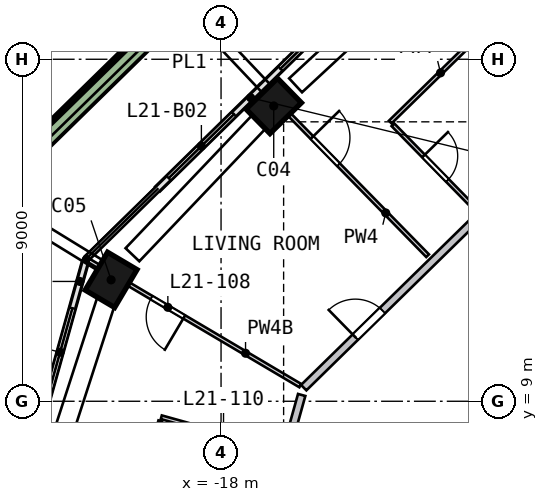
"""IFC4 building model, lengths in metres.
Left out: names, types, materials, properties, quantities, classifications, styles, units other than length and angle.
Written with IfcOpenShell. Run it as: python <this file> out.ifc"""

import sys

from ifc_helpers import new_model, si_unit, direction, frame, frame_2d, origin, origin_2d, place, context, subcontext, project, spatial, rectangle, extrude, element, fill, save


model = new_model("IFC4")
c1 = context("Model", 3, precision=1e-05, world=origin(), true_north=direction((0.0, 1.0)))
c2 = subcontext(c1, "Body", "Model", "MODEL_VIEW")
j1 = project(units=[si_unit("LENGTHUNIT", "METRE"), si_unit("PLANEANGLEUNIT", "RADIAN")], contexts=[c1])
p1 = place(None, origin())
s1 = spatial("IfcSite", under=j1, at=p1, CompositionType="ELEMENT")
p2 = place(p1, origin())
s2 = spatial("IfcBuilding", under=s1, at=p2, CompositionType="ELEMENT")
p3 = place(p2, frame((0.0, 0.0, 93.0)))
s3 = spatial("IfcBuildingStorey", under=s2, at=p3, CompositionType="ELEMENT", Elevation=93.0)
p4 = place(p3, frame((-16.518, 16.867, 0.0), z_axis=(-0.079548847, -0.079244645, 0.993676138), x_axis=(-0.709905463, -0.695289434, -0.11228017)))
e1 = element("IfcColumn", 1, at=p4, inside=s3, PredefinedType="COLUMN", context=c2, shape_type="SweptSolid", body=[
    extrude(rectangle(XDim=1.15, YDim=0.9, at=origin_2d()), origin(), (0.0, 0.0, 1.0), 3.21),
])
p5 = place(p3, frame((-20.824, 12.315, 0.0), z_axis=(-0.057704047, -0.099518574, 0.993361111), x_axis=(0.505557069, 0.855090222, 0.115033745)))
e2 = element("IfcColumn", 2, at=p5, inside=s3, PredefinedType="COLUMN", context=c2, shape_type="SweptSolid", body=[
    extrude(rectangle(XDim=1.15, YDim=0.9, at=origin_2d()), origin(), (0.0, 0.0, 1.0), 3.211),
])
p6 = place(p3, frame((-5.516, 13.717, 0.0), z_axis=(0.0, 0.0, 1.0), x_axis=(-0.707106781, -0.707106781, 0.0)))
e3 = element("IfcWall", 3, at=p6, inside=s3, PredefinedType="SHEAR", context=c2, shape_type="SweptSolid", body=[
    extrude(rectangle(XDim=11.598, YDim=0.8, at=frame_2d((5.799, 0.0))), origin(), (0.0, 0.0, 1.0), 3.5),
])
p7 = place(p3, frame((-14.438, 19.71, 0.0), z_axis=(0.0, 0.0, 1.0), x_axis=(-0.714445304, -0.699691295, 0.0)))
e4 = element("IfcWall", 4, at=p7, inside=s3, PredefinedType="SOLIDWALL", context=c2, shape_type="SweptSolid", body=[
    extrude(rectangle(XDim=3.475, YDim=0.15, at=frame_2d((1.737, 0.0))), origin(), (0.0, 0.0, 1.0), 2.425),
])
p8 = place(p7, frame((0.4, 0.0, 0.0)))
e5 = element("IfcOpeningElement", 5, at=p8, cuts=e4, PredefinedType="OPENING", context=c2, shape_type="SweptSolid", body=[
    extrude(rectangle(XDim=2.4, YDim=2.4, at=frame_2d((1.2, 1.2))), frame((0.0, 0.085, 0.0), z_axis=(0.0, -1.0, 0.0), x_axis=(1.0, 0.0, 0.0)), (0.0, 0.0, 1.0), 0.17),
])
p9 = place(p3, frame((-16.92, 17.278, 0.0), z_axis=(0.0, 0.0, 1.0), x_axis=(-0.714483248, -0.699652549, 0.0)))
e6 = element("IfcWall", 6, at=p9, inside=s3, PredefinedType="SOLIDWALL", context=c2, shape_type="SweptSolid", body=[
    extrude(rectangle(XDim=3.836, YDim=0.15, at=frame_2d((1.918, 0.0))), origin(), (0.0, 0.0, 1.0), 2.425),
])
p10 = place(p9, frame((1.035, 0.0, 0.0)))
e7 = element("IfcOpeningElement", 7, at=p10, cuts=e6, PredefinedType="OPENING", context=c2, shape_type="SweptSolid", body=[
    extrude(rectangle(XDim=2.4, YDim=2.4, at=frame_2d((1.2, 1.2))), frame((0.0, 0.085, 0.0), z_axis=(0.0, -1.0, 0.0), x_axis=(1.0, 0.0, 0.0)), (0.0, 0.0, 1.0), 0.17),
])
p11 = place(p3, frame((-21.572, 12.667, 0.0), z_axis=(0.0, 0.0, 1.0), x_axis=(-0.268881842, -0.96317317, 0.0)))
e8 = element("IfcWall", 8, at=p11, inside=s3, PredefinedType="SOLIDWALL", context=c2, shape_type="SweptSolid", body=[
    extrude(rectangle(XDim=4.068, YDim=0.15, at=frame_2d((2.034, 0.0))), origin(), (0.0, 0.0, 1.0), 2.425),
])
p12 = place(p11, frame((1.268, 0.0, 0.0)))
e9 = element("IfcOpeningElement", 9, at=p12, cuts=e8, PredefinedType="OPENING", context=c2, shape_type="SweptSolid", body=[
    extrude(rectangle(XDim=2.4, YDim=2.4, at=frame_2d((1.2, 1.2))), frame((0.0, 0.085, 0.0), z_axis=(0.0, -1.0, 0.0), x_axis=(1.0, 0.0, 0.0)), (0.0, 0.0, 1.0), 0.17),
])
p13 = place(p3, frame((-14.75, 23.638, 0.0), z_axis=(0.0, 0.0, 1.0), x_axis=(-0.714471394, -0.699664653, 0.0)))
e10 = element("IfcWall", 10, at=p13, inside=s3, PredefinedType="SOLIDWALL", context=c2, shape_type="SweptSolid", body=[
    extrude(rectangle(XDim=13.224, YDim=0.5, at=frame_2d((6.612, 0.0))), origin(), (0.0, 0.0, 1.0), 0.7),
])
p14 = place(p3, frame((-18.33, 0.386, 0.0), z_axis=(0.0, 0.0, 1.0), x_axis=(0.268911641, 0.96316485, 0.0)))
e11 = element("IfcWall", 11, at=p14, inside=s3, PredefinedType="SOLIDWALL", context=c2, shape_type="SweptSolid", body=[
    extrude(rectangle(XDim=9.116, YDim=0.2, at=frame_2d((4.558, 0.0))), origin(), (0.0, 0.0, 1.0), 3.19),
])
p15 = place(p14, frame((0.2, 0.0, 0.0)))
e12 = element("IfcOpeningElement", 12, at=p15, cuts=e11, PredefinedType="OPENING", context=c2, shape_type="SweptSolid", body=[
    extrude(rectangle(XDim=1.0, YDim=2.1, at=frame_2d((0.5, 1.05))), frame((0.0, 0.11, 0.0), z_axis=(0.0, -1.0, 0.0), x_axis=(1.0, 0.0, 0.0)), (0.0, 0.0, 1.0), 0.22),
])
p16 = place(p3, frame((-15.824, 9.359, 0.0), z_axis=(0.0, 0.0, 1.0), x_axis=(0.714458026, 0.699678304, 0.0)))
e13 = element("IfcWall", 13, at=p16, inside=s3, PredefinedType="SOLIDWALL", context=c2, shape_type="SweptSolid", body=[
    extrude(rectangle(XDim=9.316, YDim=0.2, at=frame_2d((4.658, 0.0))), origin(), (0.0, 0.0, 1.0), 3.19),
])
p17 = place(p16, frame((1.9, 0.0, 0.0)))
e14 = element("IfcOpeningElement", 14, at=p17, cuts=e13, PredefinedType="OPENING", context=c2, shape_type="SweptSolid", body=[
    extrude(rectangle(XDim=1.0, YDim=2.1, at=frame_2d((0.5, 1.05))), frame((0.0, 0.11, 0.0), z_axis=(0.0, -1.0, 0.0), x_axis=(1.0, 0.0, 0.0)), (0.0, 0.0, 1.0), 0.22),
])
p18 = place(p3, frame((-19.599, 8.483, 0.0), z_axis=(0.0, 0.0, 1.0), x_axis=(-0.268912117, -0.963164718, 0.0)))
e15 = element("IfcWall", 15, at=p18, inside=s3, PredefinedType="PARTITIONING", context=c2, shape_type="SweptSolid", body=[
    extrude(rectangle(XDim=2.7, YDim=0.1, at=frame_2d((1.35, 0.0))), origin(), (0.0, 0.0, 1.0), 3.19),
])
p19 = place(p3, frame((-15.914, 9.411, 0.0), z_axis=(0.0, 0.0, 1.0), x_axis=(-0.860735822, 0.509051908, 0.0)))
e16 = element("IfcWall", 16, at=p19, inside=s3, PredefinedType="PARTITIONING", context=c2, shape_type="SweptSolid", body=[
    extrude(rectangle(XDim=6.476, YDim=0.1, at=frame_2d((3.238, 0.0))), origin(), (0.0, 0.0, 1.0), 2.69),
])
p20 = place(p19, frame((3.55, 0.0, 0.0)))
e17 = element("IfcOpeningElement", 17, at=p20, cuts=e16, PredefinedType="OPENING", context=c2, shape_type="SweptSolid", body=[
    extrude(rectangle(XDim=1.0, YDim=2.1, at=frame_2d((0.5, 1.05))), frame((0.0, 0.06, 0.0), z_axis=(0.0, -1.0, 0.0), x_axis=(1.0, 0.0, 0.0)), (0.0, 0.0, 1.0), 0.12),
])
p21 = place(p3, frame((-16.49, 7.719, 0.0), z_axis=(0.0, 0.0, 1.0), x_axis=(-0.963161842, 0.268922415, 0.0)))
e18 = element("IfcWall", 18, at=p21, inside=s3, PredefinedType="PARTITIONING", context=c2, shape_type="SweptSolid", body=[
    extrude(rectangle(XDim=3.2, YDim=0.1, at=frame_2d((1.6, 0.0))), origin(), (0.0, 0.0, 1.0), 3.19),
])
p22 = place(p21, frame((1.05, 0.0, 0.0)))
e19 = element("IfcOpeningElement", 19, at=p22, cuts=e18, PredefinedType="OPENING", context=c2, shape_type="SweptSolid", body=[
    extrude(rectangle(XDim=0.9, YDim=2.1, at=frame_2d((0.45, 1.05))), frame((0.0, 0.06, 0.0), z_axis=(0.0, -1.0, 0.0), x_axis=(1.0, 0.0, 0.0)), (0.0, 0.0, 1.0), 0.12),
])
p23 = place(p3, frame((-16.868, 17.225, 0.0), z_axis=(0.0, 0.0, 1.0), x_axis=(0.699684325, -0.71445213, 0.0)))
e20 = element("IfcWall", 20, at=p23, inside=s3, PredefinedType="PARTITIONING", context=c2, shape_type="SweptSolid", body=[
    extrude(rectangle(XDim=6.15, YDim=0.1, at=frame_2d((3.075, 0.0))), origin(), (0.0, 0.0, 1.0), 3.19),
])
p24 = place(p23, frame((1.8, 0.0, 0.0)))
e21 = element("IfcOpeningElement", 21, at=p24, cuts=e20, PredefinedType="OPENING", context=c2, shape_type="SweptSolid", body=[
    extrude(rectangle(XDim=1.0, YDim=2.1, at=frame_2d((0.5, 1.05))), frame((0.0, 0.06, 0.0), z_axis=(0.0, -1.0, 0.0), x_axis=(1.0, 0.0, 0.0)), (0.0, 0.0, 1.0), 0.12),
])
p25 = place(p3, frame((-13.478, 16.276, 0.0), z_axis=(0.0, 0.0, 1.0), x_axis=(0.699664998, -0.714471056, 0.0)))
e22 = element("IfcWall", 22, at=p25, inside=s3, PredefinedType="PARTITIONING", context=c2, shape_type="SweptSolid", body=[
    extrude(rectangle(XDim=3.1, YDim=0.1, at=frame_2d((1.55, 0.0))), origin(), (0.0, 0.0, 1.0), 3.19),
])
p26 = place(p25, frame((1.15, 0.0, 0.0)))
e23 = element("IfcOpeningElement", 23, at=p26, cuts=e22, PredefinedType="OPENING", context=c2, shape_type="SweptSolid", body=[
    extrude(rectangle(XDim=0.9, YDim=2.1, at=frame_2d((0.45, 1.05))), frame((0.0, 0.06, 0.0), z_axis=(0.0, -1.0, 0.0), x_axis=(1.0, 0.0, 0.0)), (0.0, 0.0, 1.0), 0.12),
])
p27 = place(p3, frame((-10.901, 18.939, 0.0), z_axis=(0.0, 0.0, 1.0), x_axis=(-0.714515918, -0.699619184, 0.0)))
e24 = element("IfcWall", 24, at=p27, inside=s3, PredefinedType="PARTITIONING", context=c2, shape_type="SweptSolid", body=[
    extrude(rectangle(XDim=3.704, YDim=0.1, at=frame_2d((1.852, 0.0))), origin(), (0.0, 0.0, 1.0), 3.19),
])
p28 = place(p8, origin())
e25 = element("IfcDoor", 25, at=p28, inside=s3, OperationType="SLIDING_TO_RIGHT", PredefinedType="DOOR", context=c2, shape_type="SweptSolid", body=[
    extrude(rectangle(XDim=2.4, YDim=2.4, at=frame_2d((1.2, 1.2))), frame((0.0, 0.025, 0.0), z_axis=(0.0, -1.0, 0.0), x_axis=(1.0, 0.0, 0.0)), (0.0, 0.0, 1.0), 0.05),
])
fill(e5, e25)
p29 = place(p10, origin())
e26 = element("IfcDoor", 26, at=p29, inside=s3, OperationType="SLIDING_TO_LEFT", PredefinedType="DOOR", context=c2, shape_type="SweptSolid", body=[
    extrude(rectangle(XDim=2.4, YDim=2.4, at=frame_2d((1.2, 1.2))), frame((0.0, 0.025, 0.0), z_axis=(0.0, -1.0, 0.0), x_axis=(1.0, 0.0, 0.0)), (0.0, 0.0, 1.0), 0.05),
])
fill(e7, e26)
p30 = place(p12, origin())
e27 = element("IfcDoor", 27, at=p30, inside=s3, OperationType="SLIDING_TO_LEFT", PredefinedType="DOOR", context=c2, shape_type="SweptSolid", body=[
    extrude(rectangle(XDim=2.4, YDim=2.4, at=frame_2d((1.2, 1.2))), frame((0.0, 0.025, 0.0), z_axis=(0.0, -1.0, 0.0), x_axis=(1.0, 0.0, 0.0)), (0.0, 0.0, 1.0), 0.05),
])
fill(e9, e27)
p31 = place(p17, origin())
e28 = element("IfcDoor", 28, at=p31, inside=s3, OperationType="SINGLE_SWING_LEFT", PredefinedType="DOOR", context=c2, shape_type="SweptSolid", body=[
    extrude(rectangle(XDim=1.0, YDim=2.1, at=frame_2d((0.5, 1.05))), frame((0.0, 0.025, 0.0), z_axis=(0.0, -1.0, 0.0), x_axis=(1.0, 0.0, 0.0)), (0.0, 0.0, 1.0), 0.05),
])
fill(e14, e28)
p32 = place(p24, origin())
e29 = element("IfcDoor", 29, at=p32, inside=s3, OperationType="SINGLE_SWING_LEFT", PredefinedType="DOOR", context=c2, shape_type="SweptSolid", body=[
    extrude(rectangle(XDim=1.0, YDim=2.1, at=frame_2d((0.5, 1.05))), frame((0.0, 0.025, 0.0), z_axis=(0.0, -1.0, 0.0), x_axis=(1.0, 0.0, 0.0)), (0.0, 0.0, 1.0), 0.05),
])
fill(e21, e29)
p33 = place(p20, origin())
e30 = element("IfcDoor", 30, at=p33, inside=s3, OperationType="SINGLE_SWING_LEFT", PredefinedType="DOOR", context=c2, shape_type="SweptSolid", body=[
    extrude(rectangle(XDim=1.0, YDim=2.1, at=frame_2d((0.5, 1.05))), frame((0.0, 0.025, 0.0), z_axis=(0.0, -1.0, 0.0), x_axis=(1.0, 0.0, 0.0)), (0.0, 0.0, 1.0), 0.05),
])
fill(e17, e30)
p34 = place(p26, origin())
e31 = element("IfcDoor", 31, at=p34, inside=s3, OperationType="SINGLE_SWING_LEFT", PredefinedType="DOOR", context=c2, shape_type="SweptSolid", body=[
    extrude(rectangle(XDim=0.9, YDim=2.1, at=frame_2d((0.45, 1.05))), frame((0.0, 0.025, 0.0), z_axis=(0.0, -1.0, 0.0), x_axis=(1.0, 0.0, 0.0)), (0.0, 0.0, 1.0), 0.05),
])
fill(e23, e31)
save(model, sys.argv[1])
